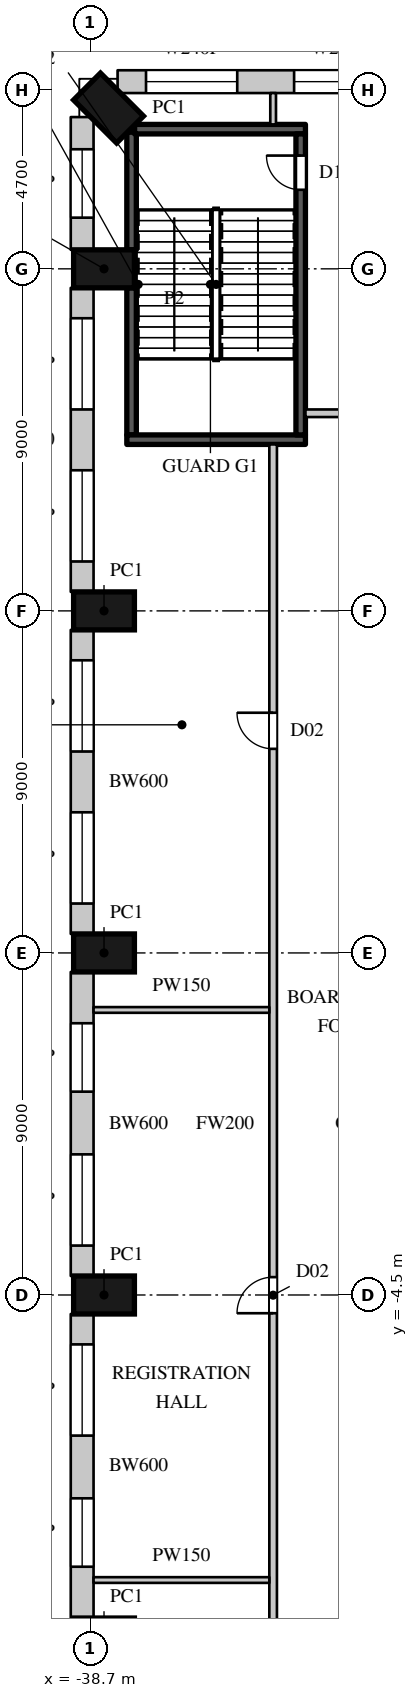
"""IFC4 building model, lengths in metres.
Left out: names, types, materials, properties, quantities, classifications, styles, units other than length and angle.
Written with IfcOpenShell. Run it as: python <this file> out.ifc"""

import sys

from ifc_helpers import new_model, si_unit, direction, frame, frame_2d, origin, origin_2d, place, context, subcontext, project, spatial, rectangle, extrude, element, fill, save


model = new_model("IFC4")
c1 = context("Model", 3, precision=1e-05, world=origin(), true_north=direction((0.0, 1.0)))
c2 = subcontext(c1, "Body", "Model", "MODEL_VIEW")
j1 = project(units=[si_unit("LENGTHUNIT", "METRE"), si_unit("PLANEANGLEUNIT", "RADIAN")], contexts=[c1])
p1 = place(None, origin())
s1 = spatial("IfcSite", under=j1, at=p1, CompositionType="ELEMENT")
p2 = place(p1, origin())
s2 = spatial("IfcBuilding", under=s1, at=p2, CompositionType="ELEMENT")
p3 = place(p2, frame((0.0, 0.0, 19.0)))
s3 = spatial("IfcBuildingStorey", under=s2, at=p3, CompositionType="ELEMENT", Elevation=19.0)
for number, where, z_axis, x_axis in (
    (1, (-38.231, 26.731, 0.0), (0.0, 0.0, 1.0), (-0.707, -0.707, 0.0)),
    (2, (-38.35, 22.5, 0.0), (0.0, 0.0, 1.0), (0.0, -1.0, 0.0)),
    (3, (-38.35, 13.5, 0.0), (0.0, 0.0, 1.0), (0.0, -1.0, 0.0)),
    (4, (-38.35, 4.5, 0.0), (0.0, 0.0, 1.0), (0.0, -1.0, 0.0)),
    (5, (-38.35, -4.5, 0.0), (0.0, 0.0, 1.0), (0.0, -1.0, 0.0)),
):
    element("IfcColumn", number, at=place(p3, frame(where, z_axis=z_axis, x_axis=x_axis)), inside=s3, PredefinedType="COLUMN", context=c2, shape_type="SweptSolid", body=[
        extrude(rectangle(XDim=1.0, YDim=1.6, at=origin_2d()), origin(), (0.0, 0.0, 1.0), 10.0),
    ])
p4 = place(p3, frame((-30.2, 27.425, 0.0), z_axis=(0.0, 0.0, 1.0), x_axis=(-1.0, 0.0, 0.0)))
e6 = element("IfcWall", 6, at=p4, inside=s3, PredefinedType="ELEMENTEDWALL", context=c2, shape_type="SweptSolid", body=[
    extrude(rectangle(XDim=7.793, YDim=0.6, at=frame_2d((3.896, 0.0))), origin(), (0.0, 0.0, 1.0), 9.6),
])
p5 = place(p4, frame((0.748, 0.0, 3.0)))
e7 = element("IfcOpeningElement", 7, at=p5, cuts=e6, PredefinedType="OPENING", context=c2, shape_type="SweptSolid", body=[
    extrude(rectangle(XDim=2.4, YDim=2.4, at=frame_2d((1.2, 1.2))), frame((0.0, 0.31, 0.0), z_axis=(0.0, -1.0, 0.0), x_axis=(1.0, 0.0, 0.0)), (0.0, 0.0, 1.0), 0.62),
])
p6 = place(p4, frame((4.645, 0.0, 3.0)))
e8 = element("IfcOpeningElement", 8, at=p6, cuts=e6, PredefinedType="OPENING", context=c2, shape_type="SweptSolid", body=[
    extrude(rectangle(XDim=2.4, YDim=2.4, at=frame_2d((1.2, 1.2))), frame((0.0, 0.31, 0.0), z_axis=(0.0, -1.0, 0.0), x_axis=(1.0, 0.0, 0.0)), (0.0, 0.0, 1.0), 0.62),
])
p7 = place(p3, frame((-38.925, 26.493, 0.0), z_axis=(0.0, 0.0, 1.0), x_axis=(0.0, -1.0, 0.0)))
e9 = element("IfcWall", 9, at=p7, inside=s3, PredefinedType="ELEMENTEDWALL", context=c2, shape_type="SweptSolid", body=[
    extrude(rectangle(XDim=3.493, YDim=0.6, at=frame_2d((1.747, 0.0))), origin(), (0.0, 0.0, 1.0), 9.6),
])
p8 = place(p7, frame((0.846, 0.0, 3.0)))
e10 = element("IfcOpeningElement", 10, at=p8, cuts=e9, PredefinedType="OPENING", context=c2, shape_type="SweptSolid", body=[
    extrude(rectangle(XDim=1.8, YDim=2.4, at=frame_2d((0.9, 1.2))), frame((0.0, 0.31, 0.0), z_axis=(0.0, -1.0, 0.0), x_axis=(1.0, 0.0, 0.0)), (0.0, 0.0, 1.0), 0.62),
])
p9 = place(p3, frame((-38.925, 22.0, 0.0), z_axis=(0.0, 0.0, 1.0), x_axis=(0.0, -1.0, 0.0)))
e11 = element("IfcWall", 11, at=p9, inside=s3, PredefinedType="ELEMENTEDWALL", context=c2, shape_type="SweptSolid", body=[
    extrude(rectangle(XDim=8.0, YDim=0.6, at=frame_2d((4.0, 0.0))), origin(), (0.0, 0.0, 1.0), 9.6),
])
p10 = place(p9, frame((0.8, 0.0, 3.0)))
e12 = element("IfcOpeningElement", 12, at=p10, cuts=e11, PredefinedType="OPENING", context=c2, shape_type="SweptSolid", body=[
    extrude(rectangle(XDim=2.4, YDim=2.4, at=frame_2d((1.2, 1.2))), frame((0.0, 0.31, 0.0), z_axis=(0.0, -1.0, 0.0), x_axis=(1.0, 0.0, 0.0)), (0.0, 0.0, 1.0), 0.62),
])
p11 = place(p9, frame((4.8, 0.0, 3.0)))
e13 = element("IfcOpeningElement", 13, at=p11, cuts=e11, PredefinedType="OPENING", context=c2, shape_type="SweptSolid", body=[
    extrude(rectangle(XDim=2.4, YDim=2.4, at=frame_2d((1.2, 1.2))), frame((0.0, 0.31, 0.0), z_axis=(0.0, -1.0, 0.0), x_axis=(1.0, 0.0, 0.0)), (0.0, 0.0, 1.0), 0.62),
])
p12 = place(p3, frame((-38.925, 13.0, 0.0), z_axis=(0.0, 0.0, 1.0), x_axis=(0.0, -1.0, 0.0)))
e14 = element("IfcWall", 14, at=p12, inside=s3, PredefinedType="ELEMENTEDWALL", context=c2, shape_type="SweptSolid", body=[
    extrude(rectangle(XDim=8.0, YDim=0.6, at=frame_2d((4.0, 0.0))), origin(), (0.0, 0.0, 1.0), 9.6),
])
p13 = place(p12, frame((0.8, 0.0, 3.0)))
e15 = element("IfcOpeningElement", 15, at=p13, cuts=e14, PredefinedType="OPENING", context=c2, shape_type="SweptSolid", body=[
    extrude(rectangle(XDim=2.4, YDim=2.4, at=frame_2d((1.2, 1.2))), frame((0.0, 0.31, 0.0), z_axis=(0.0, -1.0, 0.0), x_axis=(1.0, 0.0, 0.0)), (0.0, 0.0, 1.0), 0.62),
])
p14 = place(p12, frame((4.8, 0.0, 3.0)))
e16 = element("IfcOpeningElement", 16, at=p14, cuts=e14, PredefinedType="OPENING", context=c2, shape_type="SweptSolid", body=[
    extrude(rectangle(XDim=2.4, YDim=2.4, at=frame_2d((1.2, 1.2))), frame((0.0, 0.31, 0.0), z_axis=(0.0, -1.0, 0.0), x_axis=(1.0, 0.0, 0.0)), (0.0, 0.0, 1.0), 0.62),
])
p15 = place(p3, frame((-38.925, 4.0, 0.0), z_axis=(0.0, 0.0, 1.0), x_axis=(0.0, -1.0, 0.0)))
e17 = element("IfcWall", 17, at=p15, inside=s3, PredefinedType="ELEMENTEDWALL", context=c2, shape_type="SweptSolid", body=[
    extrude(rectangle(XDim=8.0, YDim=0.6, at=frame_2d((4.0, 0.0))), origin(), (0.0, 0.0, 1.0), 9.6),
])
p16 = place(p15, frame((4.8, 0.0, 3.0)))
e18 = element("IfcOpeningElement", 18, at=p16, cuts=e17, PredefinedType="OPENING", context=c2, shape_type="SweptSolid", body=[
    extrude(rectangle(XDim=2.4, YDim=2.4, at=frame_2d((1.2, 1.2))), frame((0.0, 0.31, 0.0), z_axis=(0.0, -1.0, 0.0), x_axis=(1.0, 0.0, 0.0)), (0.0, 0.0, 1.0), 0.62),
])
p17 = place(p15, frame((1.35, 0.0, 3.0)))
e19 = element("IfcOpeningElement", 19, at=p17, cuts=e17, PredefinedType="OPENING", context=c2, shape_type="SweptSolid", body=[
    extrude(rectangle(XDim=1.8, YDim=2.4, at=frame_2d((0.9, 1.2))), frame((0.0, 0.31, 0.0), z_axis=(0.0, -1.0, 0.0), x_axis=(1.0, 0.0, 0.0)), (0.0, 0.0, 1.0), 0.62),
])
p18 = place(p3, frame((-38.925, -5.0, 0.0), z_axis=(0.0, 0.0, 1.0), x_axis=(0.0, -1.0, 0.0)))
e20 = element("IfcWall", 20, at=p18, inside=s3, PredefinedType="ELEMENTEDWALL", context=c2, shape_type="SweptSolid", body=[
    extrude(rectangle(XDim=8.0, YDim=0.6, at=frame_2d((4.0, 0.0))), origin(), (0.0, 0.0, 1.0), 9.6),
])
p19 = place(p18, frame((0.8, 0.0, 3.0)))
e21 = element("IfcOpeningElement", 21, at=p19, cuts=e20, PredefinedType="OPENING", context=c2, shape_type="SweptSolid", body=[
    extrude(rectangle(XDim=2.4, YDim=2.4, at=frame_2d((1.2, 1.2))), frame((0.0, 0.31, 0.0), z_axis=(0.0, -1.0, 0.0), x_axis=(1.0, 0.0, 0.0)), (0.0, 0.0, 1.0), 0.62),
])
p20 = place(p18, frame((4.85, 0.0, 3.0)))
e22 = element("IfcOpeningElement", 22, at=p20, cuts=e20, PredefinedType="OPENING", context=c2, shape_type="SweptSolid", body=[
    extrude(rectangle(XDim=1.8, YDim=2.4, at=frame_2d((0.9, 1.2))), frame((0.0, 0.31, 0.0), z_axis=(0.0, -1.0, 0.0), x_axis=(1.0, 0.0, 0.0)), (0.0, 0.0, 1.0), 0.62),
])
p21 = place(p3, frame((-33.9, -17.88, 0.0), z_axis=(0.0, 0.0, 1.0), x_axis=(0.0, 1.0, 0.0)))
e23 = element("IfcWall", 23, at=p21, inside=s3, PredefinedType="PARTITIONING", context=c2, shape_type="SweptSolid", body=[
    extrude(rectangle(XDim=35.76, YDim=0.2, at=frame_2d((17.88, 0.0))), origin(), (0.0, 0.0, 1.0), 9.598),
])
p22 = place(p21, frame((2.55, 0.0, 0.0)))
e24 = element("IfcOpeningElement", 24, at=p22, cuts=e23, PredefinedType="OPENING", context=c2, shape_type="SweptSolid", body=[
    extrude(rectangle(XDim=0.95, YDim=2.2, at=frame_2d((0.475, 1.1))), frame((0.0, 0.11, 0.0), z_axis=(0.0, -1.0, 0.0), x_axis=(1.0, 0.0, 0.0)), (0.0, 0.0, 1.0), 0.22),
])
p23 = place(p21, frame((12.9, 0.0, 0.0)))
e25 = element("IfcOpeningElement", 25, at=p23, cuts=e23, PredefinedType="OPENING", context=c2, shape_type="SweptSolid", body=[
    extrude(rectangle(XDim=0.95, YDim=2.2, at=frame_2d((0.475, 1.1))), frame((0.0, 0.11, 0.0), z_axis=(0.0, -1.0, 0.0), x_axis=(1.0, 0.0, 0.0)), (0.0, 0.0, 1.0), 0.22),
])
p24 = place(p21, frame((27.75, 0.0, 0.0)))
e26 = element("IfcOpeningElement", 26, at=p24, cuts=e23, PredefinedType="OPENING", context=c2, shape_type="SweptSolid", body=[
    extrude(rectangle(XDim=0.95, YDim=2.2, at=frame_2d((0.475, 1.1))), frame((0.0, 0.11, 0.0), z_axis=(0.0, -1.0, 0.0), x_axis=(1.0, 0.0, 0.0)), (0.0, 0.0, 1.0), 0.22),
])
p25 = place(p3, frame((-33.05, 18.7, 0.0), z_axis=(0.0, 0.0, 1.0), x_axis=(1.0, 0.0, 0.0)))
e27 = element("IfcWall", 27, at=p25, inside=s3, PredefinedType="PARTITIONING", context=c2, shape_type="SweptSolid", body=[
    extrude(rectangle(XDim=3.563, YDim=0.2, at=frame_2d((1.781, 0.0))), origin(), (0.0, 0.0, 1.0), 9.598),
])
p26 = place(p25, frame((1.3, 0.0, 0.0)))
e28 = element("IfcOpeningElement", 28, at=p26, cuts=e27, PredefinedType="OPENING", context=c2, shape_type="SweptSolid", body=[
    extrude(rectangle(XDim=0.95, YDim=2.2, at=frame_2d((0.475, 1.1))), frame((0.0, 0.11, 0.0), z_axis=(0.0, -1.0, 0.0), x_axis=(1.0, 0.0, 0.0)), (0.0, 0.0, 1.0), 0.22),
])
for number, where, z_axis, x_axis in (
    (29, (-38.625, -12.0, 0.0), (0.0, 0.0, 1.0), (1.0, 0.0, 0.0)),
    (30, (-38.625, 3.0, 0.0), (0.0, 0.0, 1.0), (1.0, 0.0, 0.0)),
):
    element("IfcWall", number, at=place(p3, frame(where, z_axis=z_axis, x_axis=x_axis)), inside=s3, PredefinedType="PARTITIONING", context=c2, shape_type="SweptSolid", body=[
        extrude(rectangle(XDim=4.625, YDim=0.15, at=frame_2d((2.312, 0.0))), origin(), (0.0, 0.0, 1.0), 9.598),
    ])
p27 = place(p3, frame((-33.9, 26.3, 0.0), z_axis=(0.0, 0.0, 1.0), x_axis=(0.0, 1.0, 0.0)))
e31 = element("IfcWall", 31, at=p27, inside=s3, PredefinedType="PARTITIONING", context=c2, shape_type="SweptSolid", body=[
    extrude(rectangle(XDim=0.825, YDim=0.15, at=frame_2d((0.413, 0.0))), origin(), (0.0, 0.0, 1.0), 9.598),
])
p28 = place(p3, frame((-37.625, 18.13, 0.0), z_axis=(0.0, 0.0, 1.0), x_axis=(0.0, 1.0, 0.0)))
e32 = element("IfcWall", 32, at=p28, inside=s3, PredefinedType="SHEAR", context=c2, shape_type="SweptSolid", body=[
    extrude(rectangle(XDim=3.87, YDim=0.25, at=frame_2d((1.935, 0.0))), origin(), (0.0, 0.0, 1.0), 9.6),
])
p29 = place(p3, frame((-37.625, 23.0, 0.0), z_axis=(0.0, 0.0, 1.0), x_axis=(0.0, 1.0, 0.0)))
e33 = element("IfcWall", 33, at=p29, inside=s3, PredefinedType="SHEAR", context=c2, shape_type="SweptSolid", body=[
    extrude(rectangle(XDim=3.095, YDim=0.25, at=frame_2d((1.548, 0.0))), origin(), (0.0, 0.0, 1.0), 9.6),
])
p30 = place(p3, frame((-37.75, 18.005, 0.0), z_axis=(0.0, 0.0, 1.0), x_axis=(1.0, 0.0, 0.0)))
e34 = element("IfcWall", 34, at=p30, inside=s3, PredefinedType="SHEAR", context=c2, shape_type="SweptSolid", body=[
    extrude(rectangle(XDim=4.7, YDim=0.25, at=frame_2d((2.35, 0.0))), origin(), (0.0, 0.0, 1.0), 9.6),
])
p31 = place(p3, frame((-37.545, 26.175, 0.0), z_axis=(0.0, 0.0, 1.0), x_axis=(1.0, 0.0, 0.0)))
e35 = element("IfcWall", 35, at=p31, inside=s3, PredefinedType="SHEAR", context=c2, shape_type="SweptSolid", body=[
    extrude(rectangle(XDim=4.495, YDim=0.25, at=frame_2d((2.248, 0.0))), origin(), (0.0, 0.0, 1.0), 9.6),
])
p32 = place(p3, frame((-33.175, 18.13, 0.0), z_axis=(0.0, 0.0, 1.0), x_axis=(0.0, 1.0, 0.0)))
e36 = element("IfcWall", 36, at=p32, inside=s3, PredefinedType="SHEAR", context=c2, shape_type="SweptSolid", body=[
    extrude(rectangle(XDim=7.92, YDim=0.25, at=frame_2d((3.96, 0.0))), origin(), (0.0, 0.0, 1.0), 9.6),
])
p33 = place(p32, frame((6.45, 0.0, 0.0)))
e37 = element("IfcOpeningElement", 37, at=p33, cuts=e36, PredefinedType="OPENING", context=c2, shape_type="SweptSolid", body=[
    extrude(rectangle(XDim=0.9, YDim=2.2, at=frame_2d((0.45, 1.1))), frame((0.0, 0.135, 0.0), z_axis=(0.0, -1.0, 0.0), x_axis=(1.0, 0.0, 0.0)), (0.0, 0.0, 1.0), 0.27),
])
p34 = place(p5, origin())
e38 = element("IfcWindow", 38, at=p34, inside=s3, PartitioningType="SINGLE_PANEL", PredefinedType="WINDOW", context=c2, shape_type="SweptSolid", body=[
    extrude(rectangle(XDim=2.4, YDim=2.4, at=frame_2d((1.2, 1.2))), frame((0.0, 0.06, 0.0), z_axis=(0.0, -1.0, 0.0), x_axis=(1.0, 0.0, 0.0)), (0.0, 0.0, 1.0), 0.06),
])
fill(e7, e38)
p35 = place(p6, origin())
e39 = element("IfcWindow", 39, at=p35, inside=s3, PartitioningType="SINGLE_PANEL", PredefinedType="WINDOW", context=c2, shape_type="SweptSolid", body=[
    extrude(rectangle(XDim=2.4, YDim=2.4, at=frame_2d((1.2, 1.2))), frame((0.0, 0.06, 0.0), z_axis=(0.0, -1.0, 0.0), x_axis=(1.0, 0.0, 0.0)), (0.0, 0.0, 1.0), 0.06),
])
fill(e8, e39)
p36 = place(p8, origin())
e40 = element("IfcWindow", 40, at=p36, inside=s3, PartitioningType="SINGLE_PANEL", PredefinedType="WINDOW", context=c2, shape_type="SweptSolid", body=[
    extrude(rectangle(XDim=1.8, YDim=2.4, at=frame_2d((0.9, 1.2))), frame((0.0, 0.06, 0.0), z_axis=(0.0, -1.0, 0.0), x_axis=(1.0, 0.0, 0.0)), (0.0, 0.0, 1.0), 0.06),
])
fill(e10, e40)
p37 = place(p10, origin())
e41 = element("IfcWindow", 41, at=p37, inside=s3, PartitioningType="SINGLE_PANEL", PredefinedType="WINDOW", context=c2, shape_type="SweptSolid", body=[
    extrude(rectangle(XDim=2.4, YDim=2.4, at=frame_2d((1.2, 1.2))), frame((0.0, 0.06, 0.0), z_axis=(0.0, -1.0, 0.0), x_axis=(1.0, 0.0, 0.0)), (0.0, 0.0, 1.0), 0.06),
])
fill(e12, e41)
p38 = place(p11, origin())
e42 = element("IfcWindow", 42, at=p38, inside=s3, PartitioningType="SINGLE_PANEL", PredefinedType="WINDOW", context=c2, shape_type="SweptSolid", body=[
    extrude(rectangle(XDim=2.4, YDim=2.4, at=frame_2d((1.2, 1.2))), frame((0.0, 0.06, 0.0), z_axis=(0.0, -1.0, 0.0), x_axis=(1.0, 0.0, 0.0)), (0.0, 0.0, 1.0), 0.06),
])
fill(e13, e42)
p39 = place(p13, origin())
e43 = element("IfcWindow", 43, at=p39, inside=s3, PartitioningType="SINGLE_PANEL", PredefinedType="WINDOW", context=c2, shape_type="SweptSolid", body=[
    extrude(rectangle(XDim=2.4, YDim=2.4, at=frame_2d((1.2, 1.2))), frame((0.0, 0.06, 0.0), z_axis=(0.0, -1.0, 0.0), x_axis=(1.0, 0.0, 0.0)), (0.0, 0.0, 1.0), 0.06),
])
fill(e15, e43)
p40 = place(p14, origin())
e44 = element("IfcWindow", 44, at=p40, inside=s3, PartitioningType="SINGLE_PANEL", PredefinedType="WINDOW", context=c2, shape_type="SweptSolid", body=[
    extrude(rectangle(XDim=2.4, YDim=2.4, at=frame_2d((1.2, 1.2))), frame((0.0, 0.06, 0.0), z_axis=(0.0, -1.0, 0.0), x_axis=(1.0, 0.0, 0.0)), (0.0, 0.0, 1.0), 0.06),
])
fill(e16, e44)
p41 = place(p16, origin())
e45 = element("IfcWindow", 45, at=p41, inside=s3, PartitioningType="SINGLE_PANEL", PredefinedType="WINDOW", context=c2, shape_type="SweptSolid", body=[
    extrude(rectangle(XDim=2.4, YDim=2.4, at=frame_2d((1.2, 1.2))), frame((0.0, 0.06, 0.0), z_axis=(0.0, -1.0, 0.0), x_axis=(1.0, 0.0, 0.0)), (0.0, 0.0, 1.0), 0.06),
])
fill(e18, e45)
p42 = place(p19, origin())
e46 = element("IfcWindow", 46, at=p42, inside=s3, PartitioningType="SINGLE_PANEL", PredefinedType="WINDOW", context=c2, shape_type="SweptSolid", body=[
    extrude(rectangle(XDim=2.4, YDim=2.4, at=frame_2d((1.2, 1.2))), frame((0.0, 0.06, 0.0), z_axis=(0.0, -1.0, 0.0), x_axis=(1.0, 0.0, 0.0)), (0.0, 0.0, 1.0), 0.06),
])
fill(e21, e46)
p43 = place(p23, origin())
e47 = element("IfcDoor", 47, at=p43, inside=s3, OperationType="SINGLE_SWING_LEFT", PredefinedType="DOOR", context=c2, shape_type="SweptSolid", body=[
    extrude(rectangle(XDim=0.95, YDim=2.2, at=frame_2d((0.475, 1.1))), frame((0.0, 0.025, 0.0), z_axis=(0.0, -1.0, 0.0), x_axis=(1.0, 0.0, 0.0)), (0.0, 0.0, 1.0), 0.05),
])
fill(e25, e47)
p44 = place(p24, origin())
e48 = element("IfcDoor", 48, at=p44, inside=s3, OperationType="SINGLE_SWING_RIGHT", PredefinedType="DOOR", context=c2, shape_type="SweptSolid", body=[
    extrude(rectangle(XDim=0.95, YDim=2.2, at=frame_2d((0.475, 1.1))), frame((0.0, 0.025, 0.0), z_axis=(0.0, -1.0, 0.0), x_axis=(1.0, 0.0, 0.0)), (0.0, 0.0, 1.0), 0.05),
])
fill(e26, e48)
p45 = place(p33, origin())
e49 = element("IfcDoor", 49, at=p45, inside=s3, OperationType="SINGLE_SWING_RIGHT", PredefinedType="DOOR", context=c2, shape_type="SweptSolid", body=[
    extrude(rectangle(XDim=0.9, YDim=2.2, at=frame_2d((0.45, 1.1))), frame((0.0, 0.025, 0.0), z_axis=(0.0, -1.0, 0.0), x_axis=(1.0, 0.0, 0.0)), (0.0, 0.0, 1.0), 0.05),
])
fill(e37, e49)
p46 = place(p17, origin())
e50 = element("IfcWindow", 50, at=p46, inside=s3, PartitioningType="SINGLE_PANEL", PredefinedType="WINDOW", context=c2, shape_type="SweptSolid", body=[
    extrude(rectangle(XDim=1.8, YDim=2.4, at=frame_2d((0.9, 1.2))), frame((0.0, 0.06, 0.0), z_axis=(0.0, -1.0, 0.0), x_axis=(1.0, 0.0, 0.0)), (0.0, 0.0, 1.0), 0.06),
])
fill(e19, e50)
p47 = place(p20, origin())
e51 = element("IfcWindow", 51, at=p47, inside=s3, PartitioningType="SINGLE_PANEL", PredefinedType="WINDOW", context=c2, shape_type="SweptSolid", body=[
    extrude(rectangle(XDim=1.8, YDim=2.4, at=frame_2d((0.9, 1.2))), frame((0.0, 0.06, 0.0), z_axis=(0.0, -1.0, 0.0), x_axis=(1.0, 0.0, 0.0)), (0.0, 0.0, 1.0), 0.06),
])
fill(e22, e51)
save(model, sys.argv[1])
